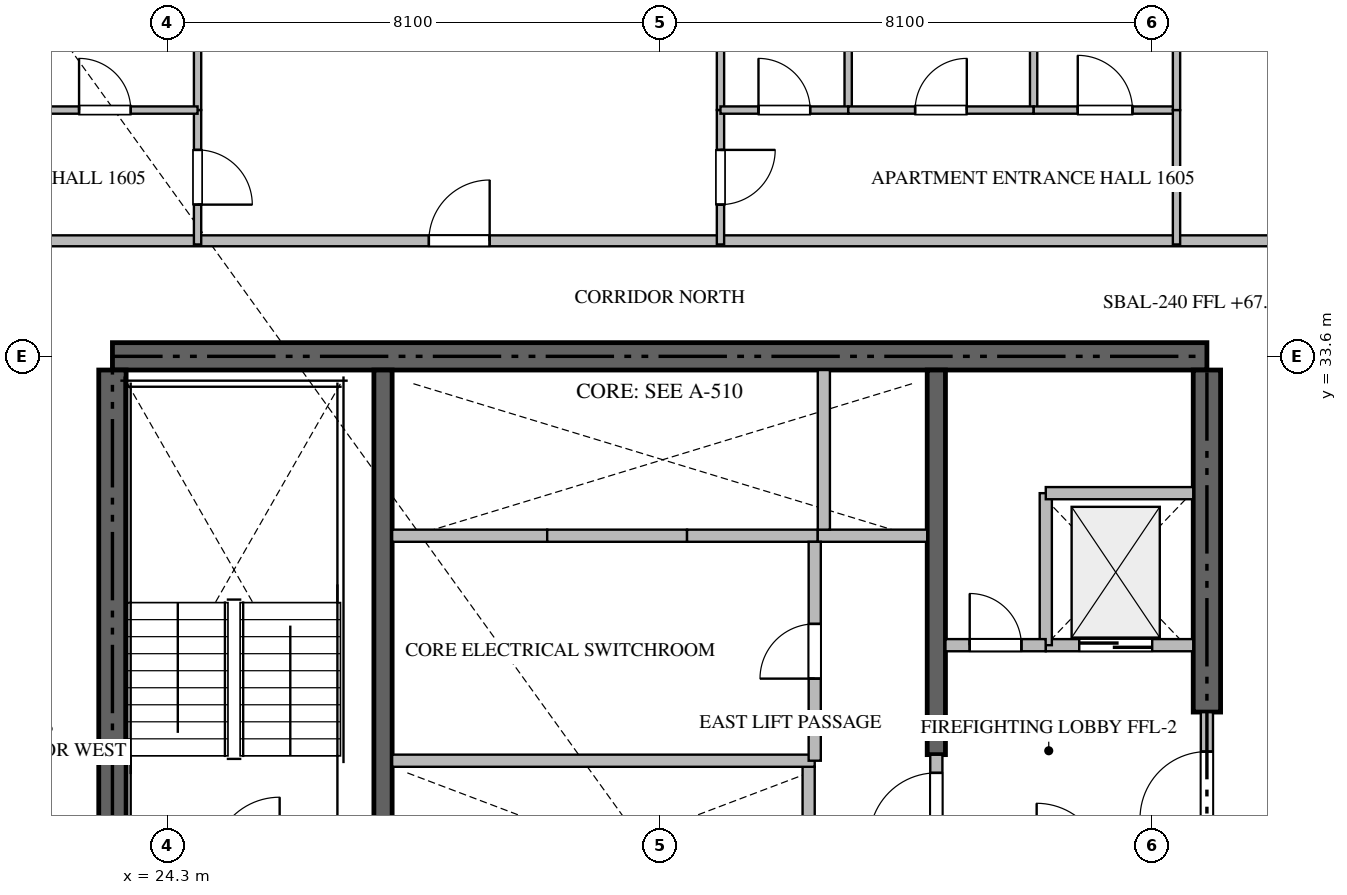
"""IFC4 building model, lengths in metres.
Left out: names, types, materials, properties, quantities, classifications, styles, units other than length and angle.
Written with IfcOpenShell. Run it as: python <this file> out.ifc"""

import sys

from ifc_helpers import new_model, si_unit, direction, frame, frame_2d, origin, place, context, subcontext, project, spatial, rectangle, extrude, source, transform, mapped, element, fill, save


model = new_model("IFC4")
c1 = context("Model", 3, precision=1e-05, world=origin(), true_north=direction((0.0, 1.0)))
c2 = subcontext(c1, "Body", "Model", "MODEL_VIEW")
j1 = project(units=[si_unit("LENGTHUNIT", "METRE"), si_unit("PLANEANGLEUNIT", "RADIAN")], contexts=[c1])
p1 = place(None, origin())
s1 = spatial("IfcSite", under=j1, at=p1, CompositionType="ELEMENT")
p2 = place(p1, origin())
s2 = spatial("IfcBuilding", under=s1, at=p2, CompositionType="ELEMENT")
p3 = place(p2, frame((0.0, 0.0, 67.95)))
s3 = spatial("IfcBuildingStorey", under=s2, at=p3, CompositionType="ELEMENT", Elevation=67.95)
p4 = place(p3, frame((41.4, 33.6, -0.26), z_axis=(0.0, 0.0, 1.0), x_axis=(-1.0, 0.0, 0.0)))
e1 = element("IfcWall", 1, at=p4, inside=s3, PredefinedType="SHEAR", context=c2, shape_type="SweptSolid", body=[
    extrude(rectangle(XDim=18.0, YDim=0.45, at=frame_2d((9.0, 0.0))), origin(), (0.0, 0.0, 1.0), 3.748),
])
p5 = place(p3, frame((23.4, 24.25, -0.26), z_axis=(0.0, 0.0, 1.0), x_axis=(0.0, 1.0, 0.0)))
e2 = element("IfcWall", 2, at=p5, inside=s3, PredefinedType="SHEAR", context=c2, shape_type="SweptSolid", body=[
    extrude(rectangle(XDim=9.125, YDim=0.45, at=frame_2d((4.562, 0.0))), origin(), (0.0, 0.0, 1.0), 3.748),
])
p6 = place(p3, frame((41.4, 27.75, -0.26), z_axis=(0.0, 0.0, 1.0), x_axis=(0.0, 1.0, 0.0)))
e3 = element("IfcWall", 3, at=p6, inside=s3, PredefinedType="SHEAR", context=c2, shape_type="SweptSolid", body=[
    extrude(rectangle(XDim=5.625, YDim=0.45, at=frame_2d((2.812, 0.0))), origin(), (0.0, 0.0, 1.0), 3.748),
])
p7 = place(p3, frame((27.85, 23.55, -0.26), z_axis=(0.0, 0.0, 1.0), x_axis=(0.0, 1.0, 0.0)))
e4 = element("IfcWall", 4, at=p7, inside=s3, PredefinedType="SHEAR", context=c2, shape_type="SweptSolid", body=[
    extrude(rectangle(XDim=9.825, YDim=0.3, at=frame_2d((4.913, 0.0))), origin(), (0.0, 0.0, 1.0), 3.748),
])
p8 = place(p3, frame((36.95, 27.05, -0.26), z_axis=(0.0, 0.0, 1.0), x_axis=(0.0, 1.0, 0.0)))
e5 = element("IfcWall", 5, at=p8, inside=s3, PredefinedType="SHEAR", context=c2, shape_type="SweptSolid", body=[
    extrude(rectangle(XDim=6.325, YDim=0.3, at=frame_2d((3.163, 0.0))), origin(), (0.0, 0.0, 1.0), 3.748),
])
p9 = place(p3, frame((38.75, 28.85, 0.0), z_axis=(0.0, 0.0, 1.0), x_axis=(1.0, 0.0, 0.0)))
e6 = element("IfcWall", 6, at=p9, inside=s3, PredefinedType="STANDARD", context=c2, shape_type="SweptSolid", body=[
    extrude(rectangle(XDim=2.425, YDim=0.2, at=frame_2d((1.212, 0.0))), origin(), (0.0, 0.0, 1.0), 3.49),
])
p10 = place(p9, frame((0.55, 0.0, 0.0)))
e7 = element("IfcOpeningElement", 7, at=p10, cuts=e6, PredefinedType="OPENING", context=c2, shape_type="SweptSolid", body=[
    extrude(rectangle(XDim=1.2, YDim=2.2, at=frame_2d((0.6, 1.1))), frame((0.0, 0.11, 0.0), z_axis=(0.0, -1.0, 0.0), x_axis=(1.0, 0.0, 0.0)), (0.0, 0.0, 1.0), 0.22),
])
p11 = place(p3, frame((34.85, 24.35, 0.0), z_axis=(0.0, 0.0, 1.0), x_axis=(0.0, 1.0, 0.0)))
e8 = element("IfcWall", 8, at=p11, inside=s3, PredefinedType="STANDARD", context=c2, shape_type="SweptSolid", body=[
    extrude(rectangle(XDim=2.5, YDim=0.2, at=frame_2d((1.25, 0.0))), origin(), (0.0, 0.0, 1.0), 3.49),
])
p12 = place(p3, frame((28.0, 30.65, 0.0), z_axis=(0.0, 0.0, 1.0), x_axis=(1.0, 0.0, 0.0)))
e9 = element("IfcWall", 9, at=p12, inside=s3, PredefinedType="STANDARD", context=c2, shape_type="SweptSolid", body=[
    extrude(rectangle(XDim=2.55, YDim=0.2, at=frame_2d((1.275, 0.0))), origin(), (0.0, 0.0, 1.0), 3.49),
])
p13 = place(p3, frame((30.55, 30.65, 0.0), z_axis=(0.0, 0.0, 1.0), x_axis=(1.0, 0.0, 0.0)))
e10 = element("IfcWall", 10, at=p13, inside=s3, PredefinedType="STANDARD", context=c2, shape_type="SweptSolid", body=[
    extrude(rectangle(XDim=2.3, YDim=0.2, at=frame_2d((1.15, 0.0))), origin(), (0.0, 0.0, 1.0), 3.49),
])
p14 = place(p3, frame((32.85, 30.65, 0.0), z_axis=(0.0, 0.0, 1.0), x_axis=(1.0, 0.0, 0.0)))
e11 = element("IfcWall", 11, at=p14, inside=s3, PredefinedType="STANDARD", context=c2, shape_type="SweptSolid", body=[
    extrude(rectangle(XDim=2.15, YDim=0.2, at=frame_2d((1.075, 0.0))), origin(), (0.0, 0.0, 1.0), 3.49),
])
p15 = place(p3, frame((35.0, 30.65, 0.0), z_axis=(0.0, 0.0, 1.0), x_axis=(1.0, 0.0, 0.0)))
e12 = element("IfcWall", 12, at=p15, inside=s3, PredefinedType="STANDARD", context=c2, shape_type="SweptSolid", body=[
    extrude(rectangle(XDim=1.8, YDim=0.2, at=frame_2d((0.9, 0.0))), origin(), (0.0, 0.0, 1.0), 3.49),
])
p16 = place(p3, frame((35.1, 30.75, 0.0), z_axis=(0.0, 0.0, 1.0), x_axis=(0.0, 1.0, 0.0)))
e13 = element("IfcWall", 13, at=p16, inside=s3, PredefinedType="STANDARD", context=c2, shape_type="SweptSolid", body=[
    extrude(rectangle(XDim=2.625, YDim=0.2, at=frame_2d((1.312, 0.0))), origin(), (0.0, 0.0, 1.0), 3.49),
])
p17 = place(p3, frame((38.75, 28.85, 0.0), z_axis=(0.0, 0.0, 1.0), x_axis=(0.0, 1.0, 0.0)))
e14 = element("IfcWall", 14, at=p17, inside=s3, PredefinedType="STANDARD", context=c2, shape_type="SweptSolid", body=[
    extrude(rectangle(XDim=2.5, YDim=0.2, at=frame_2d((1.25, 0.0))), origin(), (0.0, 0.0, 1.0), 3.49),
])
p18 = place(p3, frame((38.75, 31.35, 0.0), z_axis=(0.0, 0.0, 1.0), x_axis=(1.0, 0.0, 0.0)))
e15 = element("IfcWall", 15, at=p18, inside=s3, PredefinedType="STANDARD", context=c2, shape_type="SweptSolid", body=[
    extrude(rectangle(XDim=2.425, YDim=0.2, at=frame_2d((1.212, 0.0))), origin(), (0.0, 0.0, 1.0), 3.49),
])
p19 = place(p3, frame((37.1, 28.85, 0.0), z_axis=(0.0, 0.0, 1.0), x_axis=(1.0, 0.0, 0.0)))
e16 = element("IfcWall", 16, at=p19, inside=s3, PredefinedType="STANDARD", context=c2, shape_type="SweptSolid", body=[
    extrude(rectangle(XDim=1.648, YDim=0.2, at=frame_2d((0.824, 0.0))), origin(), (0.0, 0.0, 1.0), 3.49),
])
p20 = place(p19, frame((0.399, 0.0, 0.0)))
e17 = element("IfcOpeningElement", 17, at=p20, cuts=e16, PredefinedType="OPENING", context=c2, shape_type="SweptSolid", body=[
    extrude(rectangle(XDim=0.85, YDim=2.1, at=frame_2d((0.425, 1.05))), frame((0.0, 0.11, 0.0), z_axis=(0.0, -1.0, 0.0), x_axis=(1.0, 0.0, 0.0)), (0.0, 0.0, 1.0), 0.22),
])
p21 = place(p3, frame((41.4, 25.352, 0.0), z_axis=(0.0, 0.0, 1.0), x_axis=(0.0, 1.0, 0.0)))
e18 = element("IfcWall", 18, at=p21, inside=s3, PredefinedType="STANDARD", context=c2, shape_type="SweptSolid", body=[
    extrude(rectangle(XDim=2.396, YDim=0.2, at=frame_2d((1.198, 0.0))), origin(), (0.0, 0.0, 1.0), 3.49),
])
p22 = place(p21, frame((0.648, 0.0, 0.0)))
e19 = element("IfcOpeningElement", 19, at=p22, cuts=e18, PredefinedType="OPENING", context=c2, shape_type="SweptSolid", body=[
    extrude(rectangle(XDim=1.1, YDim=2.15, at=frame_2d((0.55, 1.075))), frame((0.0, 0.11, 0.0), z_axis=(0.0, -1.0, 0.0), x_axis=(1.0, 0.0, 0.0)), (0.0, 0.0, 1.0), 0.22),
])
p23 = place(p3, frame((36.95, 25.352, 0.0), z_axis=(0.0, 0.0, 1.0), x_axis=(0.0, 1.0, 0.0)))
e20 = element("IfcWall", 20, at=p23, inside=s3, PredefinedType="STANDARD", context=c2, shape_type="SweptSolid", body=[
    extrude(rectangle(XDim=1.696, YDim=0.2, at=frame_2d((0.848, 0.0))), origin(), (0.0, 0.0, 1.0), 3.49),
])
p24 = place(p23, frame((0.298, 0.0, 0.0)))
e21 = element("IfcOpeningElement", 21, at=p24, cuts=e20, PredefinedType="OPENING", context=c2, shape_type="SweptSolid", body=[
    extrude(rectangle(XDim=1.1, YDim=2.15, at=frame_2d((0.55, 1.075))), frame((0.0, 0.11, 0.0), z_axis=(0.0, -1.0, 0.0), x_axis=(1.0, 0.0, 0.0)), (0.0, 0.0, 1.0), 0.22),
])
p25 = place(p3, frame((28.0, 26.95, 0.0), z_axis=(0.0, 0.0, 1.0), x_axis=(1.0, 0.0, 0.0)))
e22 = element("IfcWall", 22, at=p25, inside=s3, PredefinedType="STANDARD", context=c2, shape_type="SweptSolid", body=[
    extrude(rectangle(XDim=6.95, YDim=0.2, at=frame_2d((3.475, 0.0))), origin(), (0.0, 0.0, 1.0), 3.49),
])
p26 = place(p3, frame((34.95, 26.95, 0.0), z_axis=(0.0, 0.0, 1.0), x_axis=(0.0, 1.0, 0.0)))
e23 = element("IfcWall", 23, at=p26, inside=s3, PredefinedType="STANDARD", context=c2, shape_type="SweptSolid", body=[
    extrude(rectangle(XDim=3.6, YDim=0.2, at=frame_2d((1.8, 0.0))), origin(), (0.0, 0.0, 1.0), 3.49),
])
p27 = place(p26, frame((1.35, 0.0, 0.0)))
e24 = element("IfcOpeningElement", 24, at=p27, cuts=e23, PredefinedType="OPENING", context=c2, shape_type="SweptSolid", body=[
    extrude(rectangle(XDim=0.9, YDim=2.1, at=frame_2d((0.45, 1.05))), frame((0.0, 0.11, 0.0), z_axis=(0.0, -1.0, 0.0), x_axis=(1.0, 0.0, 0.0)), (0.0, 0.0, 1.0), 0.22),
])
p28 = place(p3, frame((21.402, 35.5, 0.0), z_axis=(0.0, 0.0, 1.0), x_axis=(1.0, 0.0, 0.0)))
e25 = element("IfcWall", 25, at=p28, inside=s3, PredefinedType="PARTITIONING", context=c2, shape_type="SweptSolid", body=[
    extrude(rectangle(XDim=21.996, YDim=0.18, at=frame_2d((10.998, 0.0))), origin(), (0.0, 0.0, 1.0), 3.49),
])
p29 = place(p28, frame((7.202, 0.0, 0.0)))
e26 = element("IfcOpeningElement", 26, at=p29, cuts=e25, PredefinedType="OPENING", context=c2, shape_type="SweptSolid", body=[
    extrude(rectangle(XDim=1.0, YDim=2.15, at=frame_2d((0.5, 1.075))), frame((0.0, 0.1, 0.0), z_axis=(0.0, -1.0, 0.0), x_axis=(1.0, 0.0, 0.0)), (0.0, 0.0, 1.0), 0.2),
])
p30 = place(p3, frame((24.8, 37.65, 0.0), z_axis=(0.0, 0.0, 1.0), x_axis=(0.0, -1.0, 0.0)))
e27 = element("IfcWall", 27, at=p30, inside=s3, PredefinedType="PARTITIONING", context=c2, shape_type="SweptSolid", body=[
    extrude(rectangle(XDim=2.21, YDim=0.12, at=frame_2d((1.105, 0.0))), origin(), (0.0, 0.0, 1.0), 3.49),
])
p31 = place(p30, frame((0.655, 0.0, 0.0)))
e28 = element("IfcOpeningElement", 28, at=p31, cuts=e27, PredefinedType="OPENING", context=c2, shape_type="SweptSolid", body=[
    extrude(rectangle(XDim=0.9, YDim=2.1, at=frame_2d((0.45, 1.05))), frame((0.0, 0.07, 0.0), z_axis=(0.0, -1.0, 0.0), x_axis=(1.0, 0.0, 0.0)), (0.0, 0.0, 1.0), 0.14),
])
p32 = place(p3, frame((24.8, 43.252, 0.0), z_axis=(0.0, 0.0, 1.0), x_axis=(0.0, -1.0, 0.0)))
e29 = element("IfcWall", 29, at=p32, inside=s3, PredefinedType="PARTITIONING", context=c2, shape_type="SweptSolid", body=[
    extrude(rectangle(XDim=5.6, YDim=0.12, at=frame_2d((2.8, 0.0))), origin(), (0.0, 0.0, 1.0), 3.49),
])
p33 = place(p3, frame((21.752, 37.65, 0.0), z_axis=(0.0, 0.0, 1.0), x_axis=(1.0, 0.0, 0.0)))
e30 = element("IfcWall", 30, at=p33, inside=s3, PredefinedType="PARTITIONING", context=c2, shape_type="SweptSolid", body=[
    extrude(rectangle(XDim=3.048, YDim=0.12, at=frame_2d((1.524, 0.0))), origin(), (0.0, 0.0, 1.0), 3.49),
])
p34 = place(p33, frame((1.099, 0.0, 0.0)))
e31 = element("IfcOpeningElement", 31, at=p34, cuts=e30, PredefinedType="OPENING", context=c2, shape_type="SweptSolid", body=[
    extrude(rectangle(XDim=0.85, YDim=2.1, at=frame_2d((0.425, 1.05))), frame((0.0, 0.07, 0.0), z_axis=(0.0, -1.0, 0.0), x_axis=(1.0, 0.0, 0.0)), (0.0, 0.0, 1.0), 0.14),
])
p35 = place(p3, frame((33.4, 37.65, 0.0), z_axis=(0.0, 0.0, 1.0), x_axis=(0.0, -1.0, 0.0)))
e32 = element("IfcWall", 32, at=p35, inside=s3, PredefinedType="PARTITIONING", context=c2, shape_type="SweptSolid", body=[
    extrude(rectangle(XDim=2.21, YDim=0.12, at=frame_2d((1.105, 0.0))), origin(), (0.0, 0.0, 1.0), 3.49),
])
p36 = place(p35, frame((0.655, 0.0, 0.0)))
e33 = element("IfcOpeningElement", 33, at=p36, cuts=e32, PredefinedType="OPENING", context=c2, shape_type="SweptSolid", body=[
    extrude(rectangle(XDim=0.9, YDim=2.1, at=frame_2d((0.45, 1.05))), frame((0.0, 0.07, 0.0), z_axis=(0.0, -1.0, 0.0), x_axis=(1.0, 0.0, 0.0)), (0.0, 0.0, 1.0), 0.14),
])
p37 = place(p3, frame((33.4, 43.252, 0.0), z_axis=(0.0, 0.0, 1.0), x_axis=(0.0, -1.0, 0.0)))
e34 = element("IfcWall", 34, at=p37, inside=s3, PredefinedType="PARTITIONING", context=c2, shape_type="SweptSolid", body=[
    extrude(rectangle(XDim=5.6, YDim=0.12, at=frame_2d((2.8, 0.0))), origin(), (0.0, 0.0, 1.0), 3.49),
])
p38 = place(p3, frame((38.55, 50.105, 0.0), z_axis=(0.0, 0.0, 1.0), x_axis=(0.0, -1.0, 0.0)))
e35 = element("IfcWall", 35, at=p38, inside=s3, PredefinedType="PARTITIONING", context=c2, shape_type="SweptSolid", body=[
    extrude(rectangle(XDim=12.455, YDim=0.12, at=frame_2d((6.228, 0.0))), origin(), (0.0, 0.0, 1.0), 3.49),
])
p39 = place(p3, frame((35.5, 43.254, 0.0), z_axis=(0.0, 0.0, 1.0), x_axis=(0.0, -1.0, 0.0)))
e36 = element("IfcWall", 36, at=p39, inside=s3, PredefinedType="PARTITIONING", context=c2, shape_type="SweptSolid", body=[
    extrude(rectangle(XDim=5.604, YDim=0.12, at=frame_2d((2.802, 0.0))), origin(), (0.0, 0.0, 1.0), 3.49),
])
p40 = place(p3, frame((33.4, 37.65, 0.0), z_axis=(0.0, 0.0, 1.0), x_axis=(1.0, 0.0, 0.0)))
e37 = element("IfcWall", 37, at=p40, inside=s3, PredefinedType="PARTITIONING", context=c2, shape_type="SweptSolid", body=[
    extrude(rectangle(XDim=2.1, YDim=0.12, at=frame_2d((1.05, 0.0))), origin(), (0.0, 0.0, 1.0), 3.49),
])
p41 = place(p40, frame((0.625, 0.0, 0.0)))
e38 = element("IfcOpeningElement", 38, at=p41, cuts=e37, PredefinedType="OPENING", context=c2, shape_type="SweptSolid", body=[
    extrude(rectangle(XDim=0.85, YDim=2.1, at=frame_2d((0.425, 1.05))), frame((0.0, 0.07, 0.0), z_axis=(0.0, -1.0, 0.0), x_axis=(1.0, 0.0, 0.0)), (0.0, 0.0, 1.0), 0.14),
])
p42 = place(p3, frame((35.502, 37.65, 0.0), z_axis=(0.0, 0.0, 1.0), x_axis=(1.0, 0.0, 0.0)))
e39 = element("IfcWall", 39, at=p42, inside=s3, PredefinedType="PARTITIONING", context=c2, shape_type="SweptSolid", body=[
    extrude(rectangle(XDim=3.048, YDim=0.12, at=frame_2d((1.524, 0.0))), origin(), (0.0, 0.0, 1.0), 3.49),
])
p43 = place(p42, frame((1.099, 0.0, 0.0)))
e40 = element("IfcOpeningElement", 40, at=p43, cuts=e39, PredefinedType="OPENING", context=c2, shape_type="SweptSolid", body=[
    extrude(rectangle(XDim=0.85, YDim=2.1, at=frame_2d((0.425, 1.05))), frame((0.0, 0.07, 0.0), z_axis=(0.0, -1.0, 0.0), x_axis=(1.0, 0.0, 0.0)), (0.0, 0.0, 1.0), 0.14),
])
p44 = place(p3, frame((38.552, 37.65, 0.0), z_axis=(0.0, 0.0, 1.0), x_axis=(1.0, 0.0, 0.0)))
e41 = element("IfcWall", 41, at=p44, inside=s3, PredefinedType="PARTITIONING", context=c2, shape_type="SweptSolid", body=[
    extrude(rectangle(XDim=2.348, YDim=0.12, at=frame_2d((1.174, 0.0))), origin(), (0.0, 0.0, 1.0), 3.49),
])
p45 = place(p44, frame((0.724, 0.0, 0.0)))
e42 = element("IfcOpeningElement", 42, at=p45, cuts=e41, PredefinedType="OPENING", context=c2, shape_type="SweptSolid", body=[
    extrude(rectangle(XDim=0.9, YDim=2.1, at=frame_2d((0.45, 1.05))), frame((0.0, 0.07, 0.0), z_axis=(0.0, -1.0, 0.0), x_axis=(1.0, 0.0, 0.0)), (0.0, 0.0, 1.0), 0.14),
])
p46 = place(p3, frame((40.9, 41.305, 0.0), z_axis=(0.0, 0.0, 1.0), x_axis=(0.0, -1.0, 0.0)))
e43 = element("IfcWall", 43, at=p46, inside=s3, PredefinedType="PARTITIONING", context=c2, shape_type="SweptSolid", body=[
    extrude(rectangle(XDim=3.655, YDim=0.12, at=frame_2d((1.828, 0.0))), origin(), (0.0, 0.0, 1.0), 3.49),
])
p47 = place(p46, frame((1.403, 0.0, 0.0)))
e44 = element("IfcOpeningElement", 44, at=p47, cuts=e43, PredefinedType="OPENING", context=c2, shape_type="SweptSolid", body=[
    extrude(rectangle(XDim=0.85, YDim=2.1, at=frame_2d((0.425, 1.05))), frame((0.0, 0.07, 0.0), z_axis=(0.0, -1.0, 0.0), x_axis=(1.0, 0.0, 0.0)), (0.0, 0.0, 1.0), 0.14),
])
p48 = place(p3, frame((40.9, 37.648, 0.0), z_axis=(0.0, 0.0, 1.0), x_axis=(0.0, -1.0, 0.0)))
e45 = element("IfcWall", 45, at=p48, inside=s3, PredefinedType="PARTITIONING", context=c2, shape_type="SweptSolid", body=[
    extrude(rectangle(XDim=2.208, YDim=0.12, at=frame_2d((1.104, 0.0))), origin(), (0.0, 0.0, 1.0), 3.49),
])
m1 = source(origin(), c2, "Body", "SweptSolid", [
    extrude(rectangle(XDim=1.2, YDim=2.2, at=frame_2d((0.6, 1.1))), frame((0.0, 0.025, 0.0), z_axis=(0.0, -1.0, 0.0), x_axis=(1.0, 0.0, 0.0)), (0.0, 0.0, 1.0), 0.05),
])
p49 = place(p10, origin())
e46 = element("IfcDoor", 46, at=p49, inside=s3, OperationType="DOUBLE_DOOR_SLIDING", PredefinedType="DOOR", context=c2, shape_type="MappedRepresentation", body=[
    mapped(m1, transform((0.0, 0.0, 0.0), scale=1.0)),
])
fill(e7, e46)
m2 = source(origin(), c2, "Body", "SweptSolid", [
    extrude(rectangle(XDim=0.85, YDim=2.1, at=frame_2d((0.425, 1.05))), frame((0.0, 0.025, 0.0), z_axis=(0.0, -1.0, 0.0), x_axis=(1.0, 0.0, 0.0)), (0.0, 0.0, 1.0), 0.05),
])
p50 = place(p20, origin())
e47 = element("IfcDoor", 47, at=p50, inside=s3, OperationType="SINGLE_SWING_LEFT", PredefinedType="DOOR", context=c2, shape_type="MappedRepresentation", body=[
    mapped(m2, transform((0.0, 0.0, 0.0), scale=1.0)),
])
fill(e17, e47)
m3 = source(origin(), c2, "Body", "SweptSolid", [
    extrude(rectangle(XDim=1.1, YDim=2.15, at=frame_2d((0.55, 1.075))), frame((0.0, 0.025, 0.0), z_axis=(0.0, -1.0, 0.0), x_axis=(1.0, 0.0, 0.0)), (0.0, 0.0, 1.0), 0.05),
])
p51 = place(p22, origin())
e48 = element("IfcDoor", 48, at=p51, inside=s3, OperationType="SINGLE_SWING_LEFT", PredefinedType="DOOR", context=c2, shape_type="MappedRepresentation", body=[
    mapped(m3, transform((0.0, 0.0, 0.0), scale=1.0)),
])
fill(e19, e48)
p52 = place(p24, origin())
e49 = element("IfcDoor", 49, at=p52, inside=s3, OperationType="SINGLE_SWING_LEFT", PredefinedType="DOOR", context=c2, shape_type="MappedRepresentation", body=[
    mapped(m3, transform((0.0, 0.0, 0.0), scale=1.0)),
])
fill(e21, e49)
m4 = source(origin(), c2, "Body", "SweptSolid", [
    extrude(rectangle(XDim=0.9, YDim=2.1, at=frame_2d((0.45, 1.05))), frame((0.0, 0.025, 0.0), z_axis=(0.0, -1.0, 0.0), x_axis=(1.0, 0.0, 0.0)), (0.0, 0.0, 1.0), 0.05),
])
p53 = place(p27, origin())
e50 = element("IfcDoor", 50, at=p53, inside=s3, OperationType="SINGLE_SWING_LEFT", PredefinedType="DOOR", context=c2, shape_type="MappedRepresentation", body=[
    mapped(m4, transform((0.0, 0.0, 0.0), scale=1.0)),
])
fill(e24, e50)
m5 = source(origin(), c2, "Body", "SweptSolid", [
    extrude(rectangle(XDim=1.0, YDim=2.15, at=frame_2d((0.5, 1.075))), frame((0.0, 0.025, 0.0), z_axis=(0.0, -1.0, 0.0), x_axis=(1.0, 0.0, 0.0)), (0.0, 0.0, 1.0), 0.05),
])
p54 = place(p29, origin())
e51 = element("IfcDoor", 51, at=p54, inside=s3, OperationType="SINGLE_SWING_RIGHT", PredefinedType="DOOR", context=c2, shape_type="MappedRepresentation", body=[
    mapped(m5, transform((0.0, 0.0, 0.0), scale=1.0)),
])
fill(e26, e51)
p55 = place(p31, origin())
e52 = element("IfcDoor", 52, at=p55, inside=s3, OperationType="SINGLE_SWING_RIGHT", PredefinedType="DOOR", context=c2, shape_type="MappedRepresentation", body=[
    mapped(m4, transform((0.0, 0.0, 0.0), scale=1.0)),
])
fill(e28, e52)
p56 = place(p34, origin())
e53 = element("IfcDoor", 53, at=p56, inside=s3, OperationType="SINGLE_SWING_LEFT", PredefinedType="DOOR", context=c2, shape_type="MappedRepresentation", body=[
    mapped(m2, transform((0.0, 0.0, 0.0), scale=1.0)),
])
fill(e31, e53)
p57 = place(p36, origin())
e54 = element("IfcDoor", 54, at=p57, inside=s3, OperationType="SINGLE_SWING_LEFT", PredefinedType="DOOR", context=c2, shape_type="MappedRepresentation", body=[
    mapped(m4, transform((0.0, 0.0, 0.0), scale=1.0)),
])
fill(e33, e54)
p58 = place(p41, origin())
e55 = element("IfcDoor", 55, at=p58, inside=s3, OperationType="SINGLE_SWING_LEFT", PredefinedType="DOOR", context=c2, shape_type="MappedRepresentation", body=[
    mapped(m2, transform((0.0, 0.0, 0.0), scale=1.0)),
])
fill(e38, e55)
p59 = place(p43, origin())
e56 = element("IfcDoor", 56, at=p59, inside=s3, OperationType="SINGLE_SWING_RIGHT", PredefinedType="DOOR", context=c2, shape_type="MappedRepresentation", body=[
    mapped(m2, transform((0.0, 0.0, 0.0), scale=1.0)),
])
fill(e40, e56)
p60 = place(p45, origin())
e57 = element("IfcDoor", 57, at=p60, inside=s3, OperationType="SINGLE_SWING_LEFT", PredefinedType="DOOR", context=c2, shape_type="MappedRepresentation", body=[
    mapped(m4, transform((0.0, 0.0, 0.0), scale=1.0)),
])
fill(e42, e57)
save(model, sys.argv[1])
